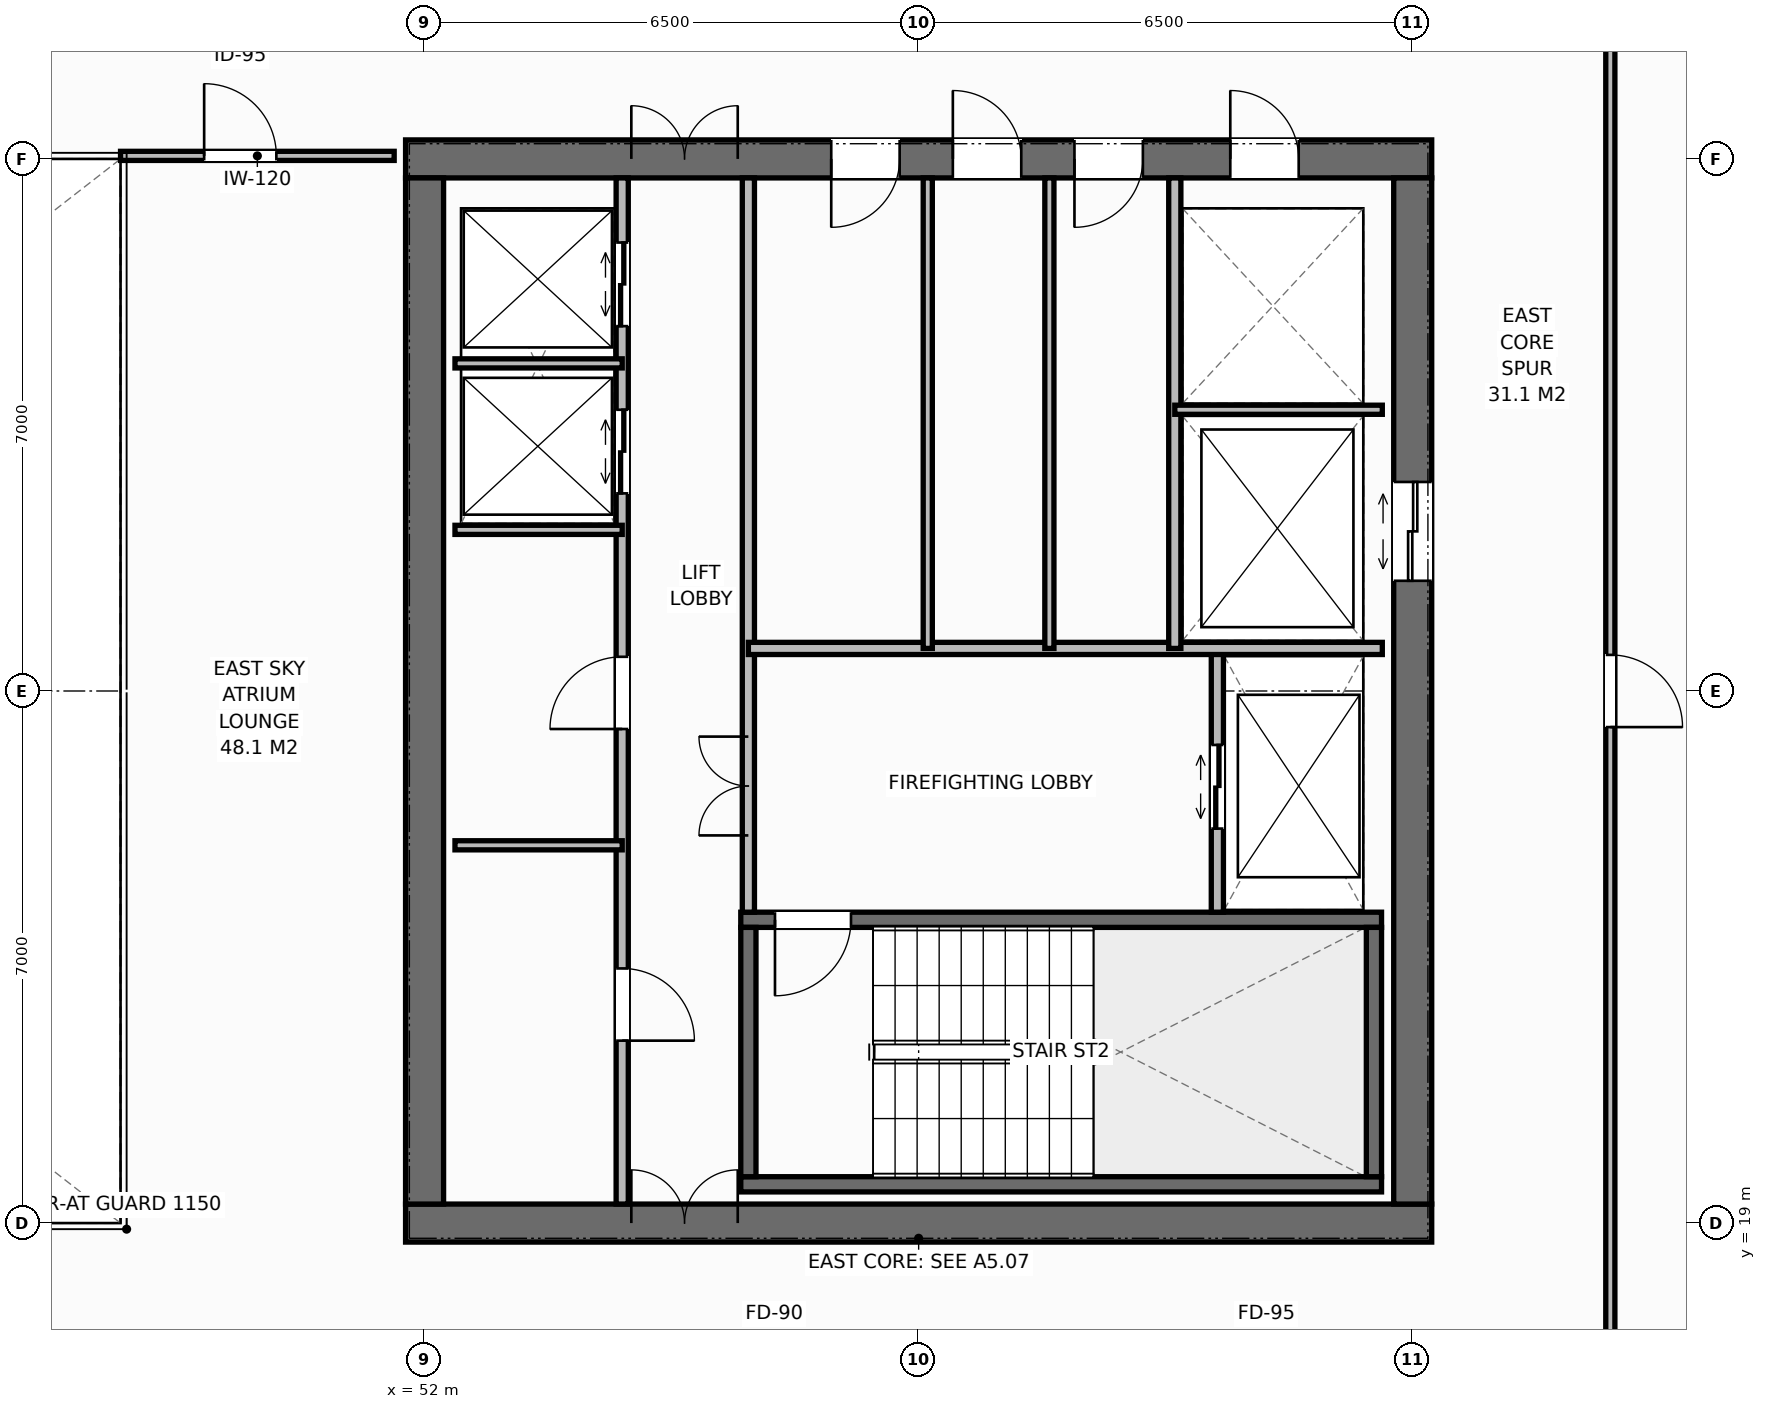
"""IFC4 building model, lengths in metres.
Left out: names, types, materials, properties, quantities, classifications, styles, units other than length and angle.
Written with IfcOpenShell. Run it as: python <this file> out.ifc"""

import sys

from ifc_helpers import new_model, si_unit, direction, frame, frame_2d, origin, place, context, subcontext, project, spatial, rectangle, extrude, element, fill, save


model = new_model("IFC4")
c1 = context("Model", 3, precision=1e-05, world=origin(), true_north=direction((0.0, 1.0)))
c2 = subcontext(c1, "Body", "Model", "MODEL_VIEW")
j1 = project(units=[si_unit("LENGTHUNIT", "METRE"), si_unit("PLANEANGLEUNIT", "RADIAN")], contexts=[c1])
p1 = place(None, origin())
s1 = spatial("IfcSite", under=j1, at=p1, CompositionType="ELEMENT")
p2 = place(p1, origin())
s2 = spatial("IfcBuilding", under=s1, at=p2, CompositionType="ELEMENT")
p3 = place(p2, frame((0.0, 0.0, 221.4)))
s3 = spatial("IfcBuildingStorey", under=s2, at=p3, CompositionType="ELEMENT", Elevation=221.4)
p4 = place(p3, frame((51.75, 19.0, 0.0), z_axis=(0.0, 0.0, 1.0), x_axis=(1.0, 0.0, 0.0)))
e1 = element("IfcWall", 1, at=p4, inside=s3, PredefinedType="SHEAR", context=c2, shape_type="SweptSolid", body=[
    extrude(rectangle(XDim=13.5, YDim=0.5, at=frame_2d((6.75, 0.0))), origin(), (0.0, 0.0, 1.0), 3.8),
])
p5 = place(p4, frame((2.97, 0.0, 0.0)))
e2 = element("IfcOpeningElement", 2, at=p5, cuts=e1, PredefinedType="OPENING", context=c2, shape_type="SweptSolid", body=[
    extrude(rectangle(XDim=1.4, YDim=2.2, at=frame_2d((0.7, 1.1))), frame((0.0, 0.26, 0.0), z_axis=(0.0, -1.0, 0.0), x_axis=(1.0, 0.0, 0.0)), (0.0, 0.0, 1.0), 0.52),
])
p6 = place(p3, frame((51.75, 33.0, 0.0), z_axis=(0.0, 0.0, 1.0), x_axis=(1.0, 0.0, 0.0)))
e3 = element("IfcWall", 3, at=p6, inside=s3, PredefinedType="SHEAR", context=c2, shape_type="SweptSolid", body=[
    extrude(rectangle(XDim=13.5, YDim=0.5, at=frame_2d((6.75, 0.0))), origin(), (0.0, 0.0, 1.0), 3.8),
])
p7 = place(p6, frame((2.97, 0.0, 0.0)))
e4 = element("IfcOpeningElement", 4, at=p7, cuts=e3, PredefinedType="OPENING", context=c2, shape_type="SweptSolid", body=[
    extrude(rectangle(XDim=1.4, YDim=2.2, at=frame_2d((0.7, 1.1))), frame((0.0, 0.26, 0.0), z_axis=(0.0, -1.0, 0.0), x_axis=(1.0, 0.0, 0.0)), (0.0, 0.0, 1.0), 0.52),
])
p8 = place(p6, frame((10.85, 0.0, 0.0)))
e5 = element("IfcOpeningElement", 5, at=p8, cuts=e3, PredefinedType="OPENING", context=c2, shape_type="SweptSolid", body=[
    extrude(rectangle(XDim=0.9, YDim=2.15, at=frame_2d((0.45, 1.075))), frame((0.0, 0.26, 0.0), z_axis=(0.0, -1.0, 0.0), x_axis=(1.0, 0.0, 0.0)), (0.0, 0.0, 1.0), 0.52),
])
p9 = place(p6, frame((5.6, 0.0, 0.0)))
e6 = element("IfcOpeningElement", 6, at=p9, cuts=e3, PredefinedType="OPENING", context=c2, shape_type="SweptSolid", body=[
    extrude(rectangle(XDim=0.9, YDim=2.15, at=frame_2d((0.45, 1.075))), frame((0.0, 0.26, 0.0), z_axis=(0.0, -1.0, 0.0), x_axis=(1.0, 0.0, 0.0)), (0.0, 0.0, 1.0), 0.52),
])
p10 = place(p6, frame((7.2, 0.0, 0.0)))
e7 = element("IfcOpeningElement", 7, at=p10, cuts=e3, PredefinedType="OPENING", context=c2, shape_type="SweptSolid", body=[
    extrude(rectangle(XDim=0.9, YDim=2.15, at=frame_2d((0.45, 1.075))), frame((0.0, 0.26, 0.0), z_axis=(0.0, -1.0, 0.0), x_axis=(1.0, 0.0, 0.0)), (0.0, 0.0, 1.0), 0.52),
])
p11 = place(p6, frame((8.8, 0.0, 0.0)))
e8 = element("IfcOpeningElement", 8, at=p11, cuts=e3, PredefinedType="OPENING", context=c2, shape_type="SweptSolid", body=[
    extrude(rectangle(XDim=0.9, YDim=2.15, at=frame_2d((0.45, 1.075))), frame((0.0, 0.26, 0.0), z_axis=(0.0, -1.0, 0.0), x_axis=(1.0, 0.0, 0.0)), (0.0, 0.0, 1.0), 0.52),
])
p12 = place(p3, frame((52.0, 19.25, 0.0), z_axis=(0.0, 0.0, 1.0), x_axis=(0.0, 1.0, 0.0)))
e9 = element("IfcWall", 9, at=p12, inside=s3, PredefinedType="SHEAR", context=c2, shape_type="SweptSolid", body=[
    extrude(rectangle(XDim=13.5, YDim=0.5, at=frame_2d((6.75, 0.0))), origin(), (0.0, 0.0, 1.0), 3.8),
])
p13 = place(p3, frame((65.0, 19.25, 0.0), z_axis=(0.0, 0.0, 1.0), x_axis=(0.0, 1.0, 0.0)))
e10 = element("IfcWall", 10, at=p13, inside=s3, PredefinedType="SHEAR", context=c2, shape_type="SweptSolid", body=[
    extrude(rectangle(XDim=13.5, YDim=0.5, at=frame_2d((6.75, 0.0))), origin(), (0.0, 0.0, 1.0), 3.8),
])
p14 = place(p13, frame((8.2, 0.0, 0.0)))
e11 = element("IfcOpeningElement", 11, at=p14, cuts=e10, PredefinedType="OPENING", context=c2, shape_type="SweptSolid", body=[
    extrude(rectangle(XDim=1.3, YDim=2.2, at=frame_2d((0.65, 1.1))), frame((0.0, 0.26, 0.0), z_axis=(0.0, -1.0, 0.0), x_axis=(1.0, 0.0, 0.0)), (0.0, 0.0, 1.0), 0.52),
])
p15 = place(p3, frame((56.16, 19.51, 0.0), z_axis=(0.0, 0.0, 1.0), x_axis=(1.0, 0.0, 0.0)))
e12 = element("IfcWall", 12, at=p15, inside=s3, PredefinedType="SHEAR", context=c2, shape_type="SweptSolid", body=[
    extrude(rectangle(XDim=8.43, YDim=0.2, at=frame_2d((4.215, 0.0))), origin(), (0.0, 0.0, 1.0), 3.8),
])
p16 = place(p3, frame((56.16, 22.99, 0.0), z_axis=(0.0, 0.0, 1.0), x_axis=(1.0, 0.0, 0.0)))
e13 = element("IfcWall", 13, at=p16, inside=s3, PredefinedType="SHEAR", context=c2, shape_type="SweptSolid", body=[
    extrude(rectangle(XDim=8.43, YDim=0.2, at=frame_2d((4.215, 0.0))), origin(), (0.0, 0.0, 1.0), 3.8),
])
p17 = place(p16, frame((0.45, 0.0, 0.0)))
e14 = element("IfcOpeningElement", 14, at=p17, cuts=e13, PredefinedType="OPENING", context=c2, shape_type="SweptSolid", body=[
    extrude(rectangle(XDim=1.0, YDim=2.15, at=frame_2d((0.5, 1.075))), frame((0.0, 0.11, 0.0), z_axis=(0.0, -1.0, 0.0), x_axis=(1.0, 0.0, 0.0)), (0.0, 0.0, 1.0), 0.22),
])
for number, where, z_axis, x_axis in (
    (15, (56.26, 19.61, 0.0), (0.0, 0.0, 1.0), (0.0, 1.0, 0.0)),
    (16, (64.49, 19.61, 0.0), (0.0, 0.0, 1.0), (0.0, 1.0, 0.0)),
):
    element("IfcWall", number, at=place(p3, frame(where, z_axis=z_axis, x_axis=x_axis)), inside=s3, PredefinedType="SHEAR", context=c2, shape_type="SweptSolid", body=[
        extrude(rectangle(XDim=3.28, YDim=0.2, at=frame_2d((1.64, 0.0))), origin(), (0.0, 0.0, 1.0), 3.8),
    ])
p18 = place(p3, frame((54.6, 19.25, 0.0), z_axis=(0.0, 0.0, 1.0), x_axis=(0.0, 1.0, 0.0)))
e17 = element("IfcWall", 17, at=p18, inside=s3, PredefinedType="STANDARD", context=c2, shape_type="SweptSolid", body=[
    extrude(rectangle(XDim=13.5, YDim=0.16, at=frame_2d((6.75, 0.0))), origin(), (0.0, 0.0, 1.0), 3.58),
])
p19 = place(p18, frame((2.15, 0.0, 0.0)))
e18 = element("IfcOpeningElement", 18, at=p19, cuts=e17, PredefinedType="OPENING", context=c2, shape_type="SweptSolid", body=[
    extrude(rectangle(XDim=0.95, YDim=2.15, at=frame_2d((0.475, 1.075))), frame((0.0, 0.09, 0.0), z_axis=(0.0, -1.0, 0.0), x_axis=(1.0, 0.0, 0.0)), (0.0, 0.0, 1.0), 0.18),
])
p20 = place(p18, frame((6.25, 0.0, 0.0)))
e19 = element("IfcOpeningElement", 19, at=p20, cuts=e17, PredefinedType="OPENING", context=c2, shape_type="SweptSolid", body=[
    extrude(rectangle(XDim=0.95, YDim=2.15, at=frame_2d((0.475, 1.075))), frame((0.0, 0.09, 0.0), z_axis=(0.0, -1.0, 0.0), x_axis=(1.0, 0.0, 0.0)), (0.0, 0.0, 1.0), 0.18),
])
p21 = place(p18, frame((9.35, 0.0, 0.0)))
e20 = element("IfcOpeningElement", 20, at=p21, cuts=e17, PredefinedType="OPENING", context=c2, shape_type="SweptSolid", body=[
    extrude(rectangle(XDim=1.1, YDim=2.2, at=frame_2d((0.55, 1.1))), frame((0.0, 0.09, 0.0), z_axis=(0.0, -1.0, 0.0), x_axis=(1.0, 0.0, 0.0)), (0.0, 0.0, 1.0), 0.18),
])
p22 = place(p18, frame((11.55, 0.0, 0.0)))
e21 = element("IfcOpeningElement", 21, at=p22, cuts=e17, PredefinedType="OPENING", context=c2, shape_type="SweptSolid", body=[
    extrude(rectangle(XDim=1.1, YDim=2.2, at=frame_2d((0.55, 1.1))), frame((0.0, 0.09, 0.0), z_axis=(0.0, -1.0, 0.0), x_axis=(1.0, 0.0, 0.0)), (0.0, 0.0, 1.0), 0.18),
])
p23 = place(p3, frame((56.26, 23.09, 0.0), z_axis=(0.0, 0.0, 1.0), x_axis=(0.0, 1.0, 0.0)))
e22 = element("IfcWall", 22, at=p23, inside=s3, PredefinedType="STANDARD", context=c2, shape_type="SweptSolid", body=[
    extrude(rectangle(XDim=9.66, YDim=0.16, at=frame_2d((4.83, 0.0))), origin(), (0.0, 0.0, 1.0), 3.58),
])
p24 = place(p23, frame((1.01, 0.0, 0.0)))
e23 = element("IfcOpeningElement", 23, at=p24, cuts=e22, PredefinedType="OPENING", context=c2, shape_type="SweptSolid", body=[
    extrude(rectangle(XDim=1.3, YDim=2.2, at=frame_2d((0.65, 1.1))), frame((0.0, 0.09, 0.0), z_axis=(0.0, -1.0, 0.0), x_axis=(1.0, 0.0, 0.0)), (0.0, 0.0, 1.0), 0.18),
])
for number, where, z_axis, x_axis in (
    (24, (52.4, 23.97, 0.0), (0.0, 0.0, 1.0), (1.0, 0.0, 0.0)),
    (25, (52.4, 28.12, 0.0), (0.0, 0.0, 1.0), (1.0, 0.0, 0.0)),
    (26, (52.4, 30.31, 0.0), (0.0, 0.0, 1.0), (1.0, 0.0, 0.0)),
):
    element("IfcWall", number, at=place(p3, frame(where, z_axis=z_axis, x_axis=x_axis)), inside=s3, PredefinedType="PARTITIONING", context=c2, shape_type="SweptSolid", body=[
        extrude(rectangle(XDim=2.2, YDim=0.12, at=frame_2d((1.1, 0.0))), origin(), (0.0, 0.0, 1.0), 3.58),
    ])
p25 = place(p3, frame((62.43, 23.09, 0.0), z_axis=(0.0, 0.0, 1.0), x_axis=(0.0, 1.0, 0.0)))
e27 = element("IfcWall", 27, at=p25, inside=s3, PredefinedType="STANDARD", context=c2, shape_type="SweptSolid", body=[
    extrude(rectangle(XDim=3.47, YDim=0.16, at=frame_2d((1.735, 0.0))), origin(), (0.0, 0.0, 1.0), 3.58),
])
p26 = place(p25, frame((1.1, 0.0, 0.0)))
e28 = element("IfcOpeningElement", 28, at=p26, cuts=e27, PredefinedType="OPENING", context=c2, shape_type="SweptSolid", body=[
    extrude(rectangle(XDim=1.1, YDim=2.2, at=frame_2d((0.55, 1.1))), frame((0.0, 0.09, 0.0), z_axis=(0.0, -1.0, 0.0), x_axis=(1.0, 0.0, 0.0)), (0.0, 0.0, 1.0), 0.18),
])
p27 = place(p3, frame((56.26, 26.56, 0.0), z_axis=(0.0, 0.0, 1.0), x_axis=(1.0, 0.0, 0.0)))
e29 = element("IfcWall", 29, at=p27, inside=s3, PredefinedType="STANDARD", context=c2, shape_type="SweptSolid", body=[
    extrude(rectangle(XDim=8.34, YDim=0.16, at=frame_2d((4.17, 0.0))), origin(), (0.0, 0.0, 1.0), 3.58),
])
p28 = place(p3, frame((61.87, 26.56, 0.0), z_axis=(0.0, 0.0, 1.0), x_axis=(0.0, 1.0, 0.0)))
e30 = element("IfcWall", 30, at=p28, inside=s3, PredefinedType="STANDARD", context=c2, shape_type="SweptSolid", body=[
    extrude(rectangle(XDim=6.19, YDim=0.16, at=frame_2d((3.095, 0.0))), origin(), (0.0, 0.0, 1.0), 3.58),
])
p29 = place(p3, frame((61.87, 29.7, 0.0), z_axis=(0.0, 0.0, 1.0), x_axis=(1.0, 0.0, 0.0)))
e31 = element("IfcWall", 31, at=p29, inside=s3, PredefinedType="PARTITIONING", context=c2, shape_type="SweptSolid", body=[
    extrude(rectangle(XDim=2.73, YDim=0.12, at=frame_2d((1.365, 0.0))), origin(), (0.0, 0.0, 1.0), 3.58),
])
for number, where, z_axis, x_axis in (
    (32, (58.62, 26.56, 0.0), (0.0, 0.0, 1.0), (0.0, 1.0, 0.0)),
    (33, (60.22, 26.56, 0.0), (0.0, 0.0, 1.0), (0.0, 1.0, 0.0)),
):
    element("IfcWall", number, at=place(p3, frame(where, z_axis=z_axis, x_axis=x_axis)), inside=s3, PredefinedType="PARTITIONING", context=c2, shape_type="SweptSolid", body=[
        extrude(rectangle(XDim=6.19, YDim=0.12, at=frame_2d((3.095, 0.0))), origin(), (0.0, 0.0, 1.0), 3.58),
    ])
p30 = place(p3, frame((48.0, 33.04, 0.0), z_axis=(0.0, 0.0, 1.0), x_axis=(1.0, 0.0, 0.0)))
e34 = element("IfcWall", 34, at=p30, inside=s3, PredefinedType="PARTITIONING", context=c2, shape_type="SweptSolid", body=[
    extrude(rectangle(XDim=3.6, YDim=0.12, at=frame_2d((1.8, 0.0))), origin(), (0.0, 0.0, 1.0), 3.32),
])
p31 = place(p30, frame((1.1, 0.0, 0.0)))
e35 = element("IfcOpeningElement", 35, at=p31, cuts=e34, PredefinedType="OPENING", context=c2, shape_type="SweptSolid", body=[
    extrude(rectangle(XDim=0.95, YDim=2.15, at=frame_2d((0.475, 1.075))), frame((0.0, 0.07, 0.0), z_axis=(0.0, -1.0, 0.0), x_axis=(1.0, 0.0, 0.0)), (0.0, 0.0, 1.0), 0.14),
])
p32 = place(p3, frame((67.6, 16.5, 0.0), z_axis=(0.0, 0.0, 1.0), x_axis=(0.0, 1.0, 0.0)))
e36 = element("IfcWall", 36, at=p32, inside=s3, PredefinedType="PARTITIONING", context=c2, shape_type="SweptSolid", body=[
    extrude(rectangle(XDim=19.0, YDim=0.12, at=frame_2d((9.5, 0.0))), origin(), (0.0, 0.0, 1.0), 3.58),
])
p33 = place(p32, frame((9.025, 0.0, 0.0)))
e37 = element("IfcOpeningElement", 37, at=p33, cuts=e36, PredefinedType="OPENING", context=c2, shape_type="SweptSolid", body=[
    extrude(rectangle(XDim=0.95, YDim=2.15, at=frame_2d((0.475, 1.075))), frame((0.0, 0.07, 0.0), z_axis=(0.0, -1.0, 0.0), x_axis=(1.0, 0.0, 0.0)), (0.0, 0.0, 1.0), 0.14),
])
p34 = place(p5, origin())
e38 = element("IfcDoor", 38, at=p34, inside=s3, OperationType="DOUBLE_DOOR_SINGLE_SWING", PredefinedType="DOOR", context=c2, shape_type="SweptSolid", body=[
    extrude(rectangle(XDim=1.4, YDim=2.2, at=frame_2d((0.7, 1.1))), frame((0.0, 0.075, 0.0), z_axis=(0.0, -1.0, 0.0), x_axis=(1.0, 0.0, 0.0)), (0.0, 0.0, 1.0), 0.05),
])
fill(e2, e38)
p35 = place(p7, origin())
e39 = element("IfcDoor", 39, at=p35, inside=s3, OperationType="DOUBLE_DOOR_SINGLE_SWING", PredefinedType="DOOR", context=c2, shape_type="SweptSolid", body=[
    extrude(rectangle(XDim=1.4, YDim=2.2, at=frame_2d((0.7, 1.1))), frame((0.0, -0.025, 0.0), z_axis=(0.0, -1.0, 0.0), x_axis=(1.0, 0.0, 0.0)), (0.0, 0.0, 1.0), 0.05),
])
fill(e4, e39)
p36 = place(p19, origin())
e40 = element("IfcDoor", 40, at=p36, inside=s3, OperationType="SINGLE_SWING_RIGHT", PredefinedType="DOOR", context=c2, shape_type="SweptSolid", body=[
    extrude(rectangle(XDim=0.95, YDim=2.15, at=frame_2d((0.475, 1.075))), frame((0.0, 0.025, 0.0), z_axis=(0.0, -1.0, 0.0), x_axis=(1.0, 0.0, 0.0)), (0.0, 0.0, 1.0), 0.05),
])
fill(e18, e40)
p37 = place(p20, origin())
e41 = element("IfcDoor", 41, at=p37, inside=s3, OperationType="SINGLE_SWING_LEFT", PredefinedType="DOOR", context=c2, shape_type="SweptSolid", body=[
    extrude(rectangle(XDim=0.95, YDim=2.15, at=frame_2d((0.475, 1.075))), frame((0.0, 0.025, 0.0), z_axis=(0.0, -1.0, 0.0), x_axis=(1.0, 0.0, 0.0)), (0.0, 0.0, 1.0), 0.05),
])
fill(e19, e41)
p38 = place(p21, origin())
e42 = element("IfcDoor", 42, at=p38, inside=s3, OperationType="DOUBLE_DOOR_SLIDING", PredefinedType="DOOR", context=c2, shape_type="SweptSolid", body=[
    extrude(rectangle(XDim=1.1, YDim=2.2, at=frame_2d((0.55, 1.1))), frame((0.0, 0.025, 0.0), z_axis=(0.0, -1.0, 0.0), x_axis=(1.0, 0.0, 0.0)), (0.0, 0.0, 1.0), 0.05),
])
fill(e20, e42)
p39 = place(p22, origin())
e43 = element("IfcDoor", 43, at=p39, inside=s3, OperationType="DOUBLE_DOOR_SLIDING", PredefinedType="DOOR", context=c2, shape_type="SweptSolid", body=[
    extrude(rectangle(XDim=1.1, YDim=2.2, at=frame_2d((0.55, 1.1))), frame((0.0, 0.025, 0.0), z_axis=(0.0, -1.0, 0.0), x_axis=(1.0, 0.0, 0.0)), (0.0, 0.0, 1.0), 0.05),
])
fill(e21, e43)
p40 = place(p17, origin())
e44 = element("IfcDoor", 44, at=p40, inside=s3, OperationType="SINGLE_SWING_RIGHT", PredefinedType="DOOR", context=c2, shape_type="SweptSolid", body=[
    extrude(rectangle(XDim=1.0, YDim=2.15, at=frame_2d((0.5, 1.075))), frame((0.0, 0.025, 0.0), z_axis=(0.0, -1.0, 0.0), x_axis=(1.0, 0.0, 0.0)), (0.0, 0.0, 1.0), 0.05),
])
fill(e14, e44)
p41 = place(p26, origin())
e45 = element("IfcDoor", 45, at=p41, inside=s3, OperationType="DOUBLE_DOOR_SLIDING", PredefinedType="DOOR", context=c2, shape_type="SweptSolid", body=[
    extrude(rectangle(XDim=1.1, YDim=2.2, at=frame_2d((0.55, 1.1))), frame((0.0, 0.025, 0.0), z_axis=(0.0, -1.0, 0.0), x_axis=(1.0, 0.0, 0.0)), (0.0, 0.0, 1.0), 0.05),
])
fill(e28, e45)
p42 = place(p24, origin())
e46 = element("IfcDoor", 46, at=p42, inside=s3, OperationType="DOUBLE_DOOR_SINGLE_SWING", PredefinedType="DOOR", context=c2, shape_type="SweptSolid", body=[
    extrude(rectangle(XDim=1.3, YDim=2.2, at=frame_2d((0.65, 1.1))), frame((0.0, 0.025, 0.0), z_axis=(0.0, -1.0, 0.0), x_axis=(1.0, 0.0, 0.0)), (0.0, 0.0, 1.0), 0.05),
])
fill(e23, e46)
p43 = place(p14, origin())
e47 = element("IfcDoor", 47, at=p43, inside=s3, OperationType="DOUBLE_DOOR_SLIDING", PredefinedType="DOOR", context=c2, shape_type="SweptSolid", body=[
    extrude(rectangle(XDim=1.3, YDim=2.2, at=frame_2d((0.65, 1.1))), frame((0.0, 0.025, 0.0), z_axis=(0.0, -1.0, 0.0), x_axis=(1.0, 0.0, 0.0)), (0.0, 0.0, 1.0), 0.05),
])
fill(e11, e47)
p44 = place(p8, origin())
e48 = element("IfcDoor", 48, at=p44, inside=s3, OperationType="SINGLE_SWING_LEFT", PredefinedType="DOOR", context=c2, shape_type="SweptSolid", body=[
    extrude(rectangle(XDim=0.9, YDim=2.15, at=frame_2d((0.45, 1.075))), frame((0.0, -0.025, 0.0), z_axis=(0.0, -1.0, 0.0), x_axis=(1.0, 0.0, 0.0)), (0.0, 0.0, 1.0), 0.05),
])
fill(e5, e48)
p45 = place(p9, origin())
e49 = element("IfcDoor", 49, at=p45, inside=s3, OperationType="SINGLE_SWING_RIGHT", PredefinedType="DOOR", context=c2, shape_type="SweptSolid", body=[
    extrude(rectangle(XDim=0.9, YDim=2.15, at=frame_2d((0.45, 1.075))), frame((0.0, -0.025, 0.0), z_axis=(0.0, -1.0, 0.0), x_axis=(1.0, 0.0, 0.0)), (0.0, 0.0, 1.0), 0.05),
])
fill(e6, e49)
p46 = place(p10, origin())
e50 = element("IfcDoor", 50, at=p46, inside=s3, OperationType="SINGLE_SWING_LEFT", PredefinedType="DOOR", context=c2, shape_type="SweptSolid", body=[
    extrude(rectangle(XDim=0.9, YDim=2.15, at=frame_2d((0.45, 1.075))), frame((0.0, -0.025, 0.0), z_axis=(0.0, -1.0, 0.0), x_axis=(1.0, 0.0, 0.0)), (0.0, 0.0, 1.0), 0.05),
])
fill(e7, e50)
p47 = place(p11, origin())
e51 = element("IfcDoor", 51, at=p47, inside=s3, OperationType="SINGLE_SWING_RIGHT", PredefinedType="DOOR", context=c2, shape_type="SweptSolid", body=[
    extrude(rectangle(XDim=0.9, YDim=2.15, at=frame_2d((0.45, 1.075))), frame((0.0, -0.025, 0.0), z_axis=(0.0, -1.0, 0.0), x_axis=(1.0, 0.0, 0.0)), (0.0, 0.0, 1.0), 0.05),
])
fill(e8, e51)
p48 = place(p31, origin())
e52 = element("IfcDoor", 52, at=p48, inside=s3, OperationType="SINGLE_SWING_LEFT", PredefinedType="DOOR", context=c2, shape_type="SweptSolid", body=[
    extrude(rectangle(XDim=0.95, YDim=2.15, at=frame_2d((0.475, 1.075))), frame((0.0, 0.025, 0.0), z_axis=(0.0, -1.0, 0.0), x_axis=(1.0, 0.0, 0.0)), (0.0, 0.0, 1.0), 0.05),
])
fill(e35, e52)
p49 = place(p33, origin())
e53 = element("IfcDoor", 53, at=p49, inside=s3, OperationType="SINGLE_SWING_RIGHT", PredefinedType="DOOR", context=c2, shape_type="SweptSolid", body=[
    extrude(rectangle(XDim=0.95, YDim=2.15, at=frame_2d((0.475, 1.075))), frame((0.0, 0.025, 0.0), z_axis=(0.0, -1.0, 0.0), x_axis=(1.0, 0.0, 0.0)), (0.0, 0.0, 1.0), 0.05),
])
fill(e37, e53)
save(model, sys.argv[1])
